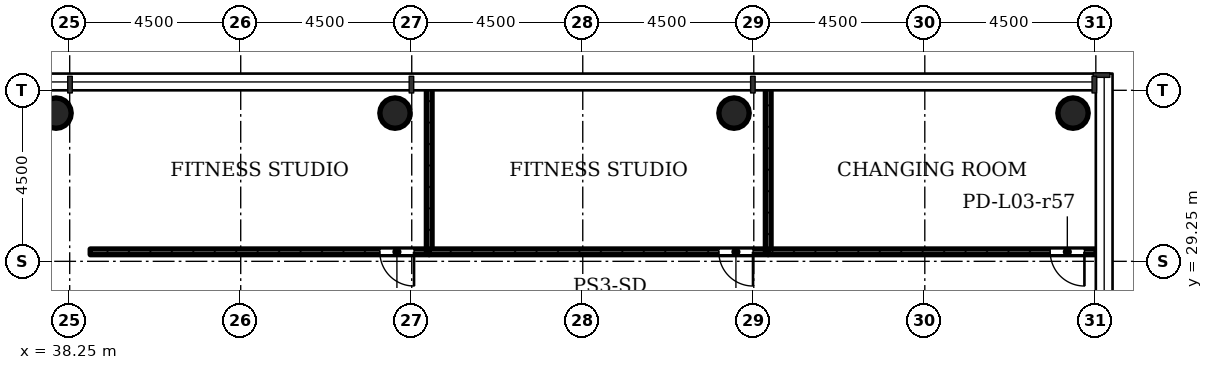
"""IFC4 building model, lengths in metres.
Left out: names, types, materials, properties, quantities, classifications, styles, units other than length and angle.
Written with IfcOpenShell. Run it as: python <this file> out.ifc"""

import sys

from ifc_helpers import new_model, si_unit, direction, frame, frame_2d, origin, origin_2d, place, context, subcontext, project, spatial, rectangle, hollow_circle, extrude, element, fill, save


model = new_model("IFC4")
c1 = context("Model", 3, precision=1e-05, world=origin(), true_north=direction((0.0, 1.0)))
c2 = subcontext(c1, "Body", "Model", "MODEL_VIEW")
j1 = project(units=[si_unit("LENGTHUNIT", "METRE"), si_unit("PLANEANGLEUNIT", "RADIAN")], contexts=[c1])
p1 = place(None, origin())
s1 = spatial("IfcSite", under=j1, at=p1, CompositionType="ELEMENT")
p2 = place(p1, origin())
s2 = spatial("IfcBuilding", under=s1, at=p2, CompositionType="ELEMENT")
p3 = place(p2, frame((0.0, 0.0, 15.5)))
s3 = spatial("IfcBuildingStorey", under=s2, at=p3, CompositionType="ELEMENT", Elevation=15.5)
for number, where, z_axis, x_axis in (
    (1, (37.89, 33.15, 0.0), (0.0, 0.0, 1.0), (1.0, 0.0, 0.0)),
    (2, (46.81, 33.15, 0.0), (0.0, 0.0, 1.0), (1.0, 0.0, 0.0)),
    (3, (55.73, 33.15, 0.0), (0.0, 0.0, 1.0), (1.0, 0.0, 0.0)),
    (4, (64.65, 33.15, 0.0), (0.0, 0.0, 1.0), (1.0, 0.0, 0.0)),
):
    element("IfcColumn", number, at=place(p3, frame(where, z_axis=z_axis, x_axis=x_axis)), inside=s3, PredefinedType="COLUMN", context=c2, shape_type="SweptSolid", body=[
        extrude(hollow_circle(Radius=0.4, WallThickness=0.028, at=origin_2d()), origin(), (0.0, 0.0, 1.0), 4.5),
    ])
p4 = place(p3, frame((47.71, 29.5, 0.0), z_axis=(0.0, 0.0, 1.0), x_axis=(-1.0, 0.0, 0.0)))
e5 = element("IfcWall", 5, at=p4, inside=s3, PredefinedType="PARTITIONING", context=c2, shape_type="SweptSolid", body=[
    extrude(rectangle(XDim=8.92, YDim=0.15, at=frame_2d((4.46, 0.0))), origin(), (0.0, 0.0, 1.0), 4.08),
])
p5 = place(p4, frame((0.4, 0.0, 0.0)))
e6 = element("IfcOpeningElement", 6, at=p5, cuts=e5, PredefinedType="OPENING", context=c2, shape_type="SweptSolid", body=[
    extrude(rectangle(XDim=0.9, YDim=2.1, at=frame_2d((0.45, 1.05))), frame((0.0, 0.085, 0.0), z_axis=(0.0, -1.0, 0.0), x_axis=(1.0, 0.0, 0.0)), (0.0, 0.0, 1.0), 0.17),
])
p6 = place(p3, frame((47.71, 33.85, 0.0), z_axis=(0.0, 0.0, 1.0), x_axis=(0.0, -1.0, 0.0)))
e7 = element("IfcWall", 7, at=p6, inside=s3, PredefinedType="PARTITIONING", context=c2, shape_type="SweptSolid", body=[
    extrude(rectangle(XDim=4.35, YDim=0.15, at=frame_2d((2.175, 0.0))), origin(), (0.0, 0.0, 1.0), 4.08),
])
p7 = place(p3, frame((56.63, 29.5, 0.0), z_axis=(0.0, 0.0, 1.0), x_axis=(-1.0, 0.0, 0.0)))
e8 = element("IfcWall", 8, at=p7, inside=s3, PredefinedType="PARTITIONING", context=c2, shape_type="SweptSolid", body=[
    extrude(rectangle(XDim=8.92, YDim=0.15, at=frame_2d((4.46, 0.0))), origin(), (0.0, 0.0, 1.0), 4.08),
])
p8 = place(p7, frame((0.4, 0.0, 0.0)))
e9 = element("IfcOpeningElement", 9, at=p8, cuts=e8, PredefinedType="OPENING", context=c2, shape_type="SweptSolid", body=[
    extrude(rectangle(XDim=0.9, YDim=2.1, at=frame_2d((0.45, 1.05))), frame((0.0, 0.085, 0.0), z_axis=(0.0, -1.0, 0.0), x_axis=(1.0, 0.0, 0.0)), (0.0, 0.0, 1.0), 0.17),
])
p9 = place(p3, frame((56.63, 33.85, 0.0), z_axis=(0.0, 0.0, 1.0), x_axis=(0.0, -1.0, 0.0)))
e10 = element("IfcWall", 10, at=p9, inside=s3, PredefinedType="PARTITIONING", context=c2, shape_type="SweptSolid", body=[
    extrude(rectangle(XDim=4.35, YDim=0.15, at=frame_2d((2.175, 0.0))), origin(), (0.0, 0.0, 1.0), 4.08),
])
p10 = place(p3, frame((65.35, 29.5, 0.0), z_axis=(0.0, 0.0, 1.0), x_axis=(-1.0, 0.0, 0.0)))
e11 = element("IfcWall", 11, at=p10, inside=s3, PredefinedType="PARTITIONING", context=c2, shape_type="SweptSolid", body=[
    extrude(rectangle(XDim=8.72, YDim=0.15, at=frame_2d((4.36, 0.0))), origin(), (0.0, 0.0, 1.0), 4.08),
])
p11 = place(p10, frame((0.4, 0.0, 0.0)))
e12 = element("IfcOpeningElement", 12, at=p11, cuts=e11, PredefinedType="OPENING", context=c2, shape_type="SweptSolid", body=[
    extrude(rectangle(XDim=0.9, YDim=2.1, at=frame_2d((0.45, 1.05))), frame((0.0, 0.085, 0.0), z_axis=(0.0, -1.0, 0.0), x_axis=(1.0, 0.0, 0.0)), (0.0, 0.0, 1.0), 0.17),
])
p12 = place(p5, origin())
e13 = element("IfcDoor", 13, at=p12, inside=s3, OperationType="SINGLE_SWING_RIGHT", PredefinedType="DOOR", context=c2, shape_type="SweptSolid", body=[
    extrude(rectangle(XDim=0.9, YDim=2.1, at=frame_2d((0.45, 1.05))), frame((0.0, 0.025, 0.0), z_axis=(0.0, -1.0, 0.0), x_axis=(1.0, 0.0, 0.0)), (0.0, 0.0, 1.0), 0.05),
])
fill(e6, e13)
p13 = place(p8, origin())
e14 = element("IfcDoor", 14, at=p13, inside=s3, OperationType="SINGLE_SWING_RIGHT", PredefinedType="DOOR", context=c2, shape_type="SweptSolid", body=[
    extrude(rectangle(XDim=0.9, YDim=2.1, at=frame_2d((0.45, 1.05))), frame((0.0, 0.025, 0.0), z_axis=(0.0, -1.0, 0.0), x_axis=(1.0, 0.0, 0.0)), (0.0, 0.0, 1.0), 0.05),
])
fill(e9, e14)
p14 = place(p11, origin())
e15 = element("IfcDoor", 15, at=p14, inside=s3, OperationType="SINGLE_SWING_RIGHT", PredefinedType="DOOR", context=c2, shape_type="SweptSolid", body=[
    extrude(rectangle(XDim=0.9, YDim=2.1, at=frame_2d((0.45, 1.05))), frame((0.0, 0.025, 0.0), z_axis=(0.0, -1.0, 0.0), x_axis=(1.0, 0.0, 0.0)), (0.0, 0.0, 1.0), 0.05),
])
fill(e12, e15)
save(model, sys.argv[1])
